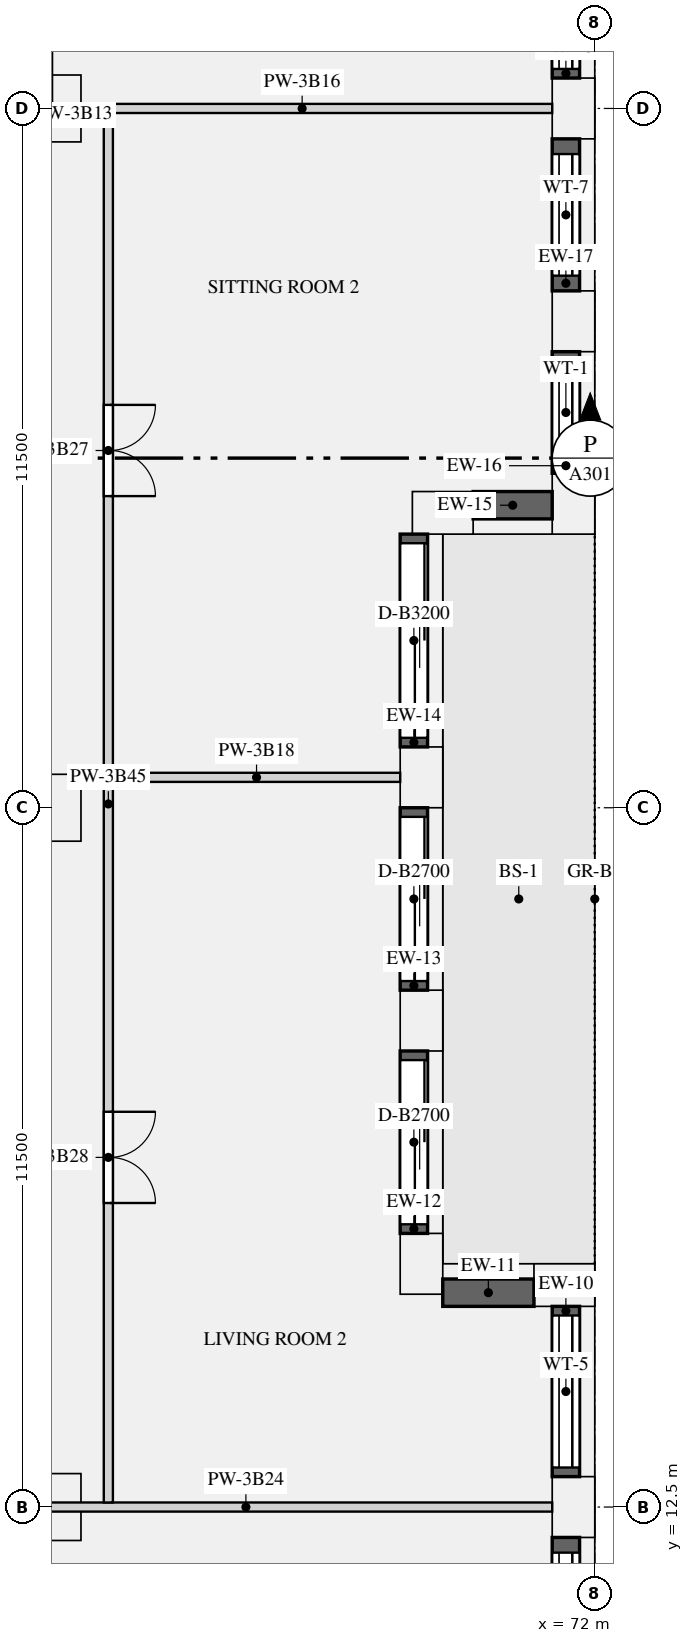
"""IFC4 building model, lengths in metres.
Left out: names, types, materials, properties, quantities, classifications, styles, units other than length and angle.
Written with IfcOpenShell. Run it as: python <this file> out.ifc"""

import sys

from ifc_helpers import new_model, si_unit, direction, frame, frame_2d, origin, origin_2d, place, context, subcontext, project, spatial, rectangle, extrude, element, fill, save


model = new_model("IFC4")
c1 = context("Model", 3, precision=1e-05, world=origin(), true_north=direction((0.0, 1.0)))
c2 = subcontext(c1, "Body", "Model", "MODEL_VIEW")
j1 = project(units=[si_unit("LENGTHUNIT", "METRE"), si_unit("PLANEANGLEUNIT", "RADIAN")], contexts=[c1])
p1 = place(None, origin())
s1 = spatial("IfcSite", under=j1, at=p1, CompositionType="ELEMENT")
p2 = place(p1, origin())
s2 = spatial("IfcBuilding", under=s1, at=p2, CompositionType="ELEMENT")
p3 = place(p2, frame((0.0, 0.0, 150.75)))
s3 = spatial("IfcBuildingStorey", under=s2, at=p3, CompositionType="ELEMENT", Elevation=150.75)
for number, where, z_axis, x_axis in (
    (1, (71.65, 12.5, 0.0), (0.0, 0.0, 1.0), (0.0, 1.0, 0.0)),
    (2, (71.5, 16.15, 0.0), (0.0, 0.0, 1.0), (-1.0, 0.0, 0.0)),
    (3, (69.15, 16.5, 0.0), (0.0, 0.0, 1.0), (0.0, 1.0, 0.0)),
    (4, (69.15, 20.5, 0.0), (0.0, 0.0, 1.0), (0.0, 1.0, 0.0)),
    (5, (69.15, 24.5, 0.0), (0.0, 0.0, 1.0), (0.0, 1.0, 0.0)),
    (6, (69.5, 28.85, 0.0), (0.0, 0.0, 1.0), (1.0, 0.0, 0.0)),
    (7, (71.65, 29.0, 0.0), (0.0, 0.0, 1.0), (0.0, 1.0, 0.0)),
    (8, (71.65, 32.0, 0.0), (0.0, 0.0, 1.0), (0.0, 1.0, 0.0)),
    (9, (71.65, 35.5, 0.0), (0.0, 0.0, 1.0), (0.0, 1.0, 0.0)),
):
    element("IfcColumn", number, at=place(p3, frame(where, z_axis=z_axis, x_axis=x_axis)), inside=s3, PredefinedType="USERDEFINED", context=c2, shape_type="SweptSolid", body=[
        extrude(rectangle(XDim=1.0, YDim=0.7, at=origin_2d()), origin(), (0.0, 0.0, 1.0), 3.15),
    ])
for number, where, z_axis, x_axis in (
    (10, (63.0, 24.0, 0.0), (0.0, 0.0, 1.0), (1.0, 0.0, 0.0)),
    (11, (63.0, 35.5, 0.0), (0.0, 0.0, 1.0), (1.0, 0.0, 0.0)),
    (12, (63.0, 12.5, 0.0), (0.0, 0.0, 1.0), (1.0, 0.0, 0.0)),
):
    element("IfcColumn", number, at=place(p3, frame(where, z_axis=z_axis, x_axis=x_axis)), inside=s3, PredefinedType="COLUMN", context=c2, shape_type="SweptSolid", body=[
        extrude(rectangle(XDim=1.1, YDim=1.1, at=origin_2d()), origin(), (0.0, 0.0, 1.0), 3.15),
    ])
p4 = place(p3, frame((71.525, 9.0, 0.9), z_axis=(0.0, 0.0, 1.0), x_axis=(0.0, 1.0, 0.0)))
e13 = element("IfcWall", 13, at=p4, inside=s3, PredefinedType="SOLIDWALL", context=c2, shape_type="SweptSolid", body=[
    extrude(rectangle(XDim=3.0, YDim=0.45, at=frame_2d((1.5, 0.0))), origin(), (0.0, 0.0, 1.0), 1.93),
])
p5 = place(p4, frame((0.25, 0.0, 0.15)))
e14 = element("IfcOpeningElement", 14, at=p5, cuts=e13, PredefinedType="OPENING", context=c2, shape_type="SweptSolid", body=[
    extrude(rectangle(XDim=2.5, YDim=1.5, at=frame_2d((1.25, 0.75))), frame((0.0, 0.235, 0.0), z_axis=(0.0, -1.0, 0.0), x_axis=(1.0, 0.0, 0.0)), (0.0, 0.0, 1.0), 0.47),
])
p6 = place(p3, frame((71.525, 13.0, 0.9), z_axis=(0.0, 0.0, 1.0), x_axis=(0.0, 1.0, 0.0)))
e15 = element("IfcWall", 15, at=p6, inside=s3, PredefinedType="SOLIDWALL", context=c2, shape_type="SweptSolid", body=[
    extrude(rectangle(XDim=2.8, YDim=0.45, at=frame_2d((1.4, 0.0))), origin(), (0.0, 0.0, 1.0), 1.93),
])
p7 = place(p6, frame((0.15, 0.0, 0.15)))
e16 = element("IfcOpeningElement", 16, at=p7, cuts=e15, PredefinedType="OPENING", context=c2, shape_type="SweptSolid", body=[
    extrude(rectangle(XDim=2.5, YDim=1.5, at=frame_2d((1.25, 0.75))), frame((0.0, 0.235, 0.0), z_axis=(0.0, -1.0, 0.0), x_axis=(1.0, 0.0, 0.0)), (0.0, 0.0, 1.0), 0.47),
])
p8 = place(p3, frame((71.0, 16.025, 0.9), z_axis=(0.0, 0.0, 1.0), x_axis=(-1.0, 0.0, 0.0)))
e17 = element("IfcWall", 17, at=p8, inside=s3, PredefinedType="SOLIDWALL", context=c2, shape_type="SweptSolid", body=[
    extrude(rectangle(XDim=1.5, YDim=0.45, at=frame_2d((0.75, 0.0))), origin(), (0.0, 0.0, 1.0), 1.93),
])
p9 = place(p3, frame((69.025, 17.0, 0.0), z_axis=(0.0, 0.0, 1.0), x_axis=(0.0, 1.0, 0.0)))
e18 = element("IfcWall", 18, at=p9, inside=s3, PredefinedType="SOLIDWALL", context=c2, shape_type="SweptSolid", body=[
    extrude(rectangle(XDim=3.0, YDim=0.45, at=frame_2d((1.5, 0.0))), origin(), (0.0, 0.0, 1.0), 2.83),
])
p10 = place(p9, frame((0.15, 0.0, 0.0)))
e19 = element("IfcOpeningElement", 19, at=p10, cuts=e18, PredefinedType="OPENING", context=c2, shape_type="SweptSolid", body=[
    extrude(rectangle(XDim=2.7, YDim=2.3, at=frame_2d((1.35, 1.15))), frame((0.0, 0.235, 0.0), z_axis=(0.0, -1.0, 0.0), x_axis=(1.0, 0.0, 0.0)), (0.0, 0.0, 1.0), 0.47),
])
p11 = place(p3, frame((69.025, 21.0, 0.0), z_axis=(0.0, 0.0, 1.0), x_axis=(0.0, 1.0, 0.0)))
e20 = element("IfcWall", 20, at=p11, inside=s3, PredefinedType="SOLIDWALL", context=c2, shape_type="SweptSolid", body=[
    extrude(rectangle(XDim=3.0, YDim=0.45, at=frame_2d((1.5, 0.0))), origin(), (0.0, 0.0, 1.0), 2.83),
])
p12 = place(p11, frame((0.15, 0.0, 0.0)))
e21 = element("IfcOpeningElement", 21, at=p12, cuts=e20, PredefinedType="OPENING", context=c2, shape_type="SweptSolid", body=[
    extrude(rectangle(XDim=2.7, YDim=2.3, at=frame_2d((1.35, 1.15))), frame((0.0, 0.235, 0.0), z_axis=(0.0, -1.0, 0.0), x_axis=(1.0, 0.0, 0.0)), (0.0, 0.0, 1.0), 0.47),
])
p13 = place(p3, frame((69.025, 25.0, 0.0), z_axis=(0.0, 0.0, 1.0), x_axis=(0.0, 1.0, 0.0)))
e22 = element("IfcWall", 22, at=p13, inside=s3, PredefinedType="SOLIDWALL", context=c2, shape_type="SweptSolid", body=[
    extrude(rectangle(XDim=3.5, YDim=0.45, at=frame_2d((1.75, 0.0))), origin(), (0.0, 0.0, 1.0), 2.83),
])
p14 = place(p13, frame((0.15, 0.0, 0.0)))
e23 = element("IfcOpeningElement", 23, at=p14, cuts=e22, PredefinedType="OPENING", context=c2, shape_type="SweptSolid", body=[
    extrude(rectangle(XDim=3.2, YDim=2.3, at=frame_2d((1.6, 1.15))), frame((0.0, 0.235, 0.0), z_axis=(0.0, -1.0, 0.0), x_axis=(1.0, 0.0, 0.0)), (0.0, 0.0, 1.0), 0.47),
])
p15 = place(p3, frame((70.0, 28.975, 0.9), z_axis=(0.0, 0.0, 1.0), x_axis=(1.0, 0.0, 0.0)))
e24 = element("IfcWall", 24, at=p15, inside=s3, PredefinedType="SOLIDWALL", context=c2, shape_type="SweptSolid", body=[
    extrude(rectangle(XDim=1.3, YDim=0.45, at=frame_2d((0.65, 0.0))), origin(), (0.0, 0.0, 1.0), 1.93),
])
p16 = place(p3, frame((71.525, 29.5, 0.9), z_axis=(0.0, 0.0, 1.0), x_axis=(0.0, 1.0, 0.0)))
e25 = element("IfcWall", 25, at=p16, inside=s3, PredefinedType="SOLIDWALL", context=c2, shape_type="SweptSolid", body=[
    extrude(rectangle(XDim=2.0, YDim=0.45, at=frame_2d((1.0, 0.0))), origin(), (0.0, 0.0, 1.0), 1.93),
])
p17 = place(p16, frame((0.25, 0.0, 0.15)))
e26 = element("IfcOpeningElement", 26, at=p17, cuts=e25, PredefinedType="OPENING", context=c2, shape_type="SweptSolid", body=[
    extrude(rectangle(XDim=1.5, YDim=1.5, at=frame_2d((0.75, 0.75))), frame((0.0, 0.235, 0.0), z_axis=(0.0, -1.0, 0.0), x_axis=(1.0, 0.0, 0.0)), (0.0, 0.0, 1.0), 0.47),
])
p18 = place(p3, frame((71.525, 32.5, 0.9), z_axis=(0.0, 0.0, 1.0), x_axis=(0.0, 1.0, 0.0)))
e27 = element("IfcWall", 27, at=p18, inside=s3, PredefinedType="SOLIDWALL", context=c2, shape_type="SweptSolid", body=[
    extrude(rectangle(XDim=2.5, YDim=0.45, at=frame_2d((1.25, 0.0))), origin(), (0.0, 0.0, 1.0), 1.93),
])
p19 = place(p18, frame((0.25, 0.0, 0.15)))
e28 = element("IfcOpeningElement", 28, at=p19, cuts=e27, PredefinedType="OPENING", context=c2, shape_type="SweptSolid", body=[
    extrude(rectangle(XDim=2.0, YDim=1.5, at=frame_2d((1.0, 0.75))), frame((0.0, 0.235, 0.0), z_axis=(0.0, -1.0, 0.0), x_axis=(1.0, 0.0, 0.0)), (0.0, 0.0, 1.0), 0.47),
])
p20 = place(p3, frame((71.525, 36.0, 0.9), z_axis=(0.0, 0.0, 1.0), x_axis=(0.0, 1.0, 0.0)))
e29 = element("IfcWall", 29, at=p20, inside=s3, PredefinedType="SOLIDWALL", context=c2, shape_type="SweptSolid", body=[
    extrude(rectangle(XDim=2.3, YDim=0.45, at=frame_2d((1.15, 0.0))), origin(), (0.0, 0.0, 1.0), 1.93),
])
p21 = place(p20, frame((0.15, 0.0, 0.15)))
e30 = element("IfcOpeningElement", 30, at=p21, cuts=e29, PredefinedType="OPENING", context=c2, shape_type="SweptSolid", body=[
    extrude(rectangle(XDim=2.0, YDim=1.5, at=frame_2d((1.0, 0.75))), frame((0.0, 0.235, 0.0), z_axis=(0.0, -1.0, 0.0), x_axis=(1.0, 0.0, 0.0)), (0.0, 0.0, 1.0), 0.47),
])
p22 = place(p3, frame((63.075, 35.5, 0.0), z_axis=(0.0, 0.0, 1.0), x_axis=(1.0, 0.0, 0.0)))
e31 = element("IfcWall", 31, at=p22, inside=s3, PredefinedType="PARTITIONING", context=c2, shape_type="SweptSolid", body=[
    extrude(rectangle(XDim=8.225, YDim=0.15, at=frame_2d((4.113, 0.0))), origin(), (0.0, 0.0, 1.0), 2.83),
])
p23 = place(p3, frame((64.075, 24.5, 0.0), z_axis=(0.0, 0.0, 1.0), x_axis=(1.0, 0.0, 0.0)))
e32 = element("IfcWall", 32, at=p23, inside=s3, PredefinedType="PARTITIONING", context=c2, shape_type="SweptSolid", body=[
    extrude(rectangle(XDim=4.725, YDim=0.15, at=frame_2d((2.363, 0.0))), origin(), (0.0, 0.0, 1.0), 2.83),
])
p24 = place(p3, frame((54.0, 12.5, 0.0), z_axis=(0.0, 0.0, 1.0), x_axis=(1.0, 0.0, 0.0)))
e33 = element("IfcWall", 33, at=p24, inside=s3, PredefinedType="PARTITIONING", context=c2, shape_type="SweptSolid", body=[
    extrude(rectangle(XDim=17.3, YDim=0.15, at=frame_2d((8.65, 0.0))), origin(), (0.0, 0.0, 1.0), 2.83),
])
p25 = place(p24, frame((5.725, 0.0, 0.0)))
e34 = element("IfcOpeningElement", 34, at=p25, cuts=e33, PredefinedType="OPENING", context=c2, shape_type="SweptSolid", body=[
    extrude(rectangle(XDim=1.5, YDim=2.1, at=frame_2d((0.75, 1.05))), frame((0.0, 0.085, 0.0), z_axis=(0.0, -1.0, 0.0), x_axis=(1.0, 0.0, 0.0)), (0.0, 0.0, 1.0), 0.17),
])
p26 = place(p3, frame((64.0, 12.575, 0.0), z_axis=(0.0, 0.0, 1.0), x_axis=(0.0, 1.0, 0.0)))
e35 = element("IfcWall", 35, at=p26, inside=s3, PredefinedType="PARTITIONING", context=c2, shape_type="SweptSolid", body=[
    extrude(rectangle(XDim=22.85, YDim=0.15, at=frame_2d((11.425, 0.0))), origin(), (0.0, 0.0, 1.0), 2.83),
])
p27 = place(p26, frame((16.55, 0.0, 0.0)))
e36 = element("IfcOpeningElement", 36, at=p27, cuts=e35, PredefinedType="OPENING", context=c2, shape_type="SweptSolid", body=[
    extrude(rectangle(XDim=1.5, YDim=2.1, at=frame_2d((0.75, 1.05))), frame((0.0, 0.085, 0.0), z_axis=(0.0, -1.0, 0.0), x_axis=(1.0, 0.0, 0.0)), (0.0, 0.0, 1.0), 0.17),
])
p28 = place(p26, frame((4.925, 0.0, 0.0)))
e37 = element("IfcOpeningElement", 37, at=p28, cuts=e35, PredefinedType="OPENING", context=c2, shape_type="SweptSolid", body=[
    extrude(rectangle(XDim=1.5, YDim=2.1, at=frame_2d((0.75, 1.05))), frame((0.0, 0.085, 0.0), z_axis=(0.0, -1.0, 0.0), x_axis=(1.0, 0.0, 0.0)), (0.0, 0.0, 1.0), 0.17),
])
p29 = place(p5, origin())
e38 = element("IfcWindow", 38, at=p29, inside=s3, PartitioningType="SINGLE_PANEL", PredefinedType="WINDOW", context=c2, shape_type="SweptSolid", body=[
    extrude(rectangle(XDim=2.5, YDim=1.5, at=frame_2d((1.25, 0.75))), frame((0.0, -0.065, 0.0), z_axis=(0.0, -1.0, 0.0), x_axis=(1.0, 0.0, 0.0)), (0.0, 0.0, 1.0), 0.06),
])
fill(e14, e38)
p30 = place(p7, origin())
e39 = element("IfcWindow", 39, at=p30, inside=s3, PartitioningType="SINGLE_PANEL", PredefinedType="WINDOW", context=c2, shape_type="SweptSolid", body=[
    extrude(rectangle(XDim=2.5, YDim=1.5, at=frame_2d((1.25, 0.75))), frame((0.0, -0.065, 0.0), z_axis=(0.0, -1.0, 0.0), x_axis=(1.0, 0.0, 0.0)), (0.0, 0.0, 1.0), 0.06),
])
fill(e16, e39)
p31 = place(p10, origin())
e40 = element("IfcDoor", 40, at=p31, inside=s3, OperationType="SLIDING_TO_LEFT", PredefinedType="DOOR", context=c2, shape_type="SweptSolid", body=[
    extrude(rectangle(XDim=2.7, YDim=2.3, at=frame_2d((1.35, 1.15))), frame((0.0, -0.07, 0.0), z_axis=(0.0, -1.0, 0.0), x_axis=(1.0, 0.0, 0.0)), (0.0, 0.0, 1.0), 0.05),
])
fill(e19, e40)
p32 = place(p12, origin())
e41 = element("IfcDoor", 41, at=p32, inside=s3, OperationType="SLIDING_TO_LEFT", PredefinedType="DOOR", context=c2, shape_type="SweptSolid", body=[
    extrude(rectangle(XDim=2.7, YDim=2.3, at=frame_2d((1.35, 1.15))), frame((0.0, -0.07, 0.0), z_axis=(0.0, -1.0, 0.0), x_axis=(1.0, 0.0, 0.0)), (0.0, 0.0, 1.0), 0.05),
])
fill(e21, e41)
p33 = place(p14, origin())
e42 = element("IfcDoor", 42, at=p33, inside=s3, OperationType="SLIDING_TO_LEFT", PredefinedType="DOOR", context=c2, shape_type="SweptSolid", body=[
    extrude(rectangle(XDim=3.2, YDim=2.3, at=frame_2d((1.6, 1.15))), frame((0.0, -0.07, 0.0), z_axis=(0.0, -1.0, 0.0), x_axis=(1.0, 0.0, 0.0)), (0.0, 0.0, 1.0), 0.05),
])
fill(e23, e42)
p34 = place(p17, origin())
e43 = element("IfcWindow", 43, at=p34, inside=s3, PartitioningType="SINGLE_PANEL", PredefinedType="WINDOW", context=c2, shape_type="SweptSolid", body=[
    extrude(rectangle(XDim=1.5, YDim=1.5, at=frame_2d((0.75, 0.75))), frame((0.0, -0.065, 0.0), z_axis=(0.0, -1.0, 0.0), x_axis=(1.0, 0.0, 0.0)), (0.0, 0.0, 1.0), 0.06),
])
fill(e26, e43)
p35 = place(p19, origin())
e44 = element("IfcWindow", 44, at=p35, inside=s3, PartitioningType="SINGLE_PANEL", PredefinedType="WINDOW", context=c2, shape_type="SweptSolid", body=[
    extrude(rectangle(XDim=2.0, YDim=1.5, at=frame_2d((1.0, 0.75))), frame((0.0, -0.065, 0.0), z_axis=(0.0, -1.0, 0.0), x_axis=(1.0, 0.0, 0.0)), (0.0, 0.0, 1.0), 0.06),
])
fill(e28, e44)
p36 = place(p21, origin())
e45 = element("IfcWindow", 45, at=p36, inside=s3, PartitioningType="SINGLE_PANEL", PredefinedType="WINDOW", context=c2, shape_type="SweptSolid", body=[
    extrude(rectangle(XDim=2.0, YDim=1.5, at=frame_2d((1.0, 0.75))), frame((0.0, -0.065, 0.0), z_axis=(0.0, -1.0, 0.0), x_axis=(1.0, 0.0, 0.0)), (0.0, 0.0, 1.0), 0.06),
])
fill(e30, e45)
p37 = place(p27, frame((1.5, 0.0, 0.0), z_axis=(0.0, 0.0, 1.0), x_axis=(-1.0, 0.0, 0.0)))
e46 = element("IfcDoor", 46, at=p37, inside=s3, OperationType="DOUBLE_DOOR_SINGLE_SWING", PredefinedType="DOOR", context=c2, shape_type="SweptSolid", body=[
    extrude(rectangle(XDim=1.5, YDim=2.1, at=frame_2d((0.75, 1.05))), frame((0.0, 0.025, 0.0), z_axis=(0.0, -1.0, 0.0), x_axis=(1.0, 0.0, 0.0)), (0.0, 0.0, 1.0), 0.05),
])
fill(e36, e46)
p38 = place(p28, frame((1.5, 0.0, 0.0), z_axis=(0.0, 0.0, 1.0), x_axis=(-1.0, 0.0, 0.0)))
e47 = element("IfcDoor", 47, at=p38, inside=s3, OperationType="DOUBLE_DOOR_SINGLE_SWING", PredefinedType="DOOR", context=c2, shape_type="SweptSolid", body=[
    extrude(rectangle(XDim=1.5, YDim=2.1, at=frame_2d((0.75, 1.05))), frame((0.0, 0.025, 0.0), z_axis=(0.0, -1.0, 0.0), x_axis=(1.0, 0.0, 0.0)), (0.0, 0.0, 1.0), 0.05),
])
fill(e37, e47)
save(model, sys.argv[1])
